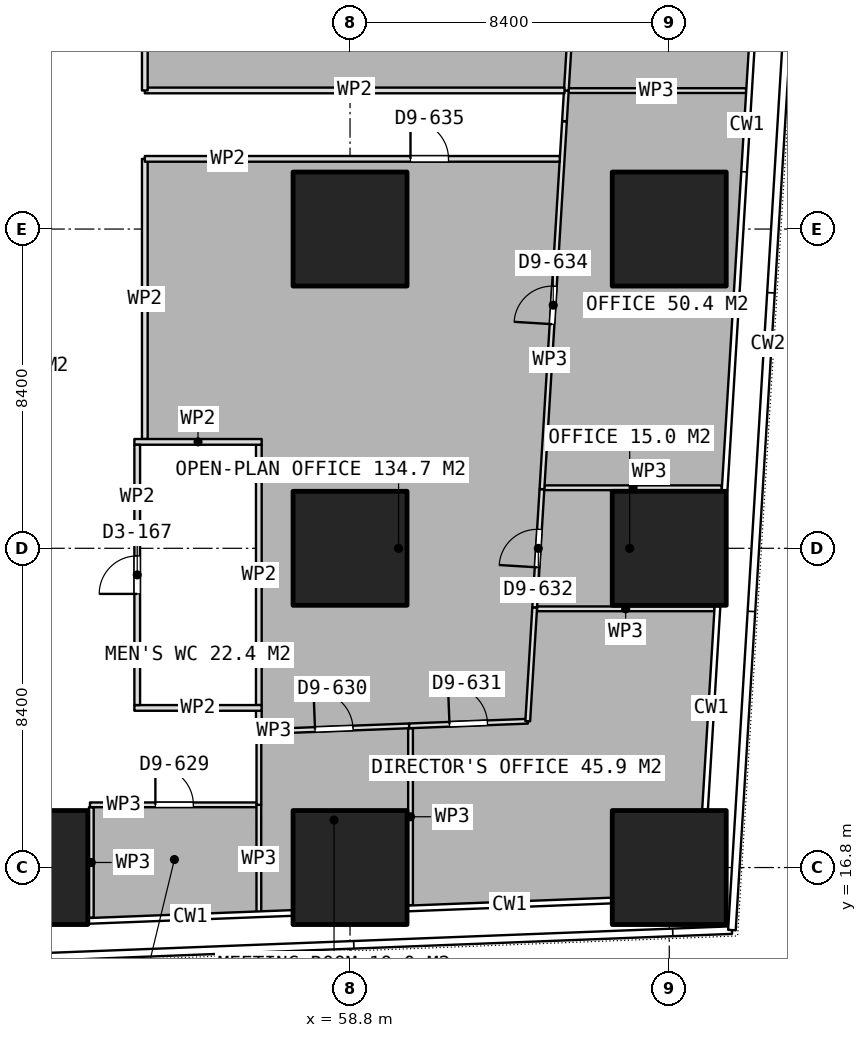
"""IFC4 building model, lengths in metres.
Left out: names, types, materials, properties, quantities, classifications, styles, units other than length and angle.
Written with IfcOpenShell. Run it as: python <this file> out.ifc"""

import sys

from ifc_helpers import new_model, si_unit, direction, frame, frame_2d, origin, origin_2d, place, context, subcontext, project, spatial, rectangle, extrude, element, fill, save


model = new_model("IFC4")
c1 = context("Model", 3, precision=1e-05, world=origin(), true_north=direction((0.0, 1.0)))
c2 = subcontext(c1, "Body", "Model", "MODEL_VIEW")
j1 = project(units=[si_unit("LENGTHUNIT", "METRE"), si_unit("PLANEANGLEUNIT", "RADIAN")], contexts=[c1])
p1 = place(None, origin())
s1 = spatial("IfcSite", under=j1, at=p1, CompositionType="ELEMENT")
p2 = place(p1, origin())
s2 = spatial("IfcBuilding", under=s1, at=p2, CompositionType="ELEMENT")
p3 = place(p2, frame((0.0, 0.0, 155.3)))
s3 = spatial("IfcBuildingStorey", under=s2, at=p3, CompositionType="ELEMENT", Elevation=155.3)
for number, where, z_axis, x_axis in (
    (1, (50.4, 16.8, 0.0), (0.0, 0.0, 1.0), (1.0, 0.0, 0.0)),
    (2, (58.8, 16.8, 0.0), (0.0, 0.0, 1.0), (1.0, 0.0, 0.0)),
    (3, (58.8, 25.2, 0.0), (0.0, 0.0, 1.0), (1.0, 0.0, 0.0)),
    (4, (58.8, 33.6, 0.0), (0.0, 0.0, 1.0), (1.0, 0.0, 0.0)),
    (5, (67.2, 16.8, 0.0), (0.0, 0.0, 1.0), (1.0, 0.0, 0.0)),
    (6, (67.2, 25.2, 0.0), (0.0, 0.0, 1.0), (1.0, 0.0, 0.0)),
    (7, (67.2, 33.6, 0.0), (0.0, 0.0, 1.0), (1.0, 0.0, 0.0)),
):
    element("IfcColumn", number, at=place(p3, frame(where, z_axis=z_axis, x_axis=x_axis)), inside=s3, PredefinedType="COLUMN", context=c2, shape_type="SweptSolid", body=[
        extrude(rectangle(XDim=3.0, YDim=3.0, at=origin_2d()), origin(), (0.0, 0.0, 1.0), 3.75),
    ])
for number, where, z_axis, x_axis in (
    (8, (53.125, 21.0, 0.0), (0.0, 0.0, 1.0), (1.0, 0.0, 0.0)),
    (9, (53.125, 28.0, 0.0), (0.0, 0.0, 1.0), (1.0, 0.0, 0.0)),
):
    element("IfcWall", number, at=place(p3, frame(where, z_axis=z_axis, x_axis=x_axis)), inside=s3, PredefinedType="PARTITIONING", context=c2, shape_type="SweptSolid", body=[
        extrude(rectangle(XDim=3.35, YDim=0.15, at=frame_2d((1.675, 0.0))), origin(), (0.0, 0.0, 1.0), 3.5),
    ])
p4 = place(p3, frame((53.2, 21.075, 0.0), z_axis=(0.0, 0.0, 1.0), x_axis=(0.0, 1.0, 0.0)))
e10 = element("IfcWall", 10, at=p4, inside=s3, PredefinedType="PARTITIONING", context=c2, shape_type="SweptSolid", body=[
    extrude(rectangle(XDim=6.85, YDim=0.15, at=frame_2d((3.425, 0.0))), origin(), (0.0, 0.0, 1.0), 3.5),
])
p5 = place(p4, frame((2.925, 0.0, 0.0)))
e11 = element("IfcOpeningElement", 11, at=p5, cuts=e10, PredefinedType="OPENING", context=c2, shape_type="SweptSolid", body=[
    extrude(rectangle(XDim=1.0, YDim=2.1, at=frame_2d((0.5, 1.05))), frame((0.0, 0.085, 0.0), z_axis=(0.0, -1.0, 0.0), x_axis=(1.0, 0.0, 0.0)), (0.0, 0.0, 1.0), 0.17),
])
p6 = place(p3, frame((56.4, 21.075, 0.0), z_axis=(0.0, 0.0, 1.0), x_axis=(0.0, 1.0, 0.0)))
e12 = element("IfcWall", 12, at=p6, inside=s3, PredefinedType="PARTITIONING", context=c2, shape_type="SweptSolid", body=[
    extrude(rectangle(XDim=6.85, YDim=0.15, at=frame_2d((3.425, 0.0))), origin(), (0.0, 0.0, 1.0), 3.5),
])
p7 = place(p3, frame((51.992, 15.479, 0.0), z_axis=(0.0, 0.0, 1.0), x_axis=(0.0, 1.0, 0.0)))
e13 = element("IfcWall", 13, at=p7, inside=s3, PredefinedType="PARTITIONING", context=c2, shape_type="SweptSolid", body=[
    extrude(rectangle(XDim=2.908, YDim=0.125, at=frame_2d((1.454, 0.0))), origin(), (0.0, 0.0, 1.0), 3.5),
])
p8 = place(p3, frame((51.957, 18.45, 0.0), z_axis=(0.0, 0.0, 1.0), x_axis=(1.0, 0.0, 0.0)))
e14 = element("IfcWall", 14, at=p8, inside=s3, PredefinedType="PARTITIONING", context=c2, shape_type="SweptSolid", body=[
    extrude(rectangle(XDim=4.443, YDim=0.125, at=frame_2d((2.221, 0.0))), origin(), (0.0, 0.0, 1.0), 3.5),
])
p9 = place(p8, frame((1.721, 0.0, 0.0)))
e15 = element("IfcOpeningElement", 15, at=p9, cuts=e14, PredefinedType="OPENING", context=c2, shape_type="SweptSolid", body=[
    extrude(rectangle(XDim=1.0, YDim=2.1, at=frame_2d((0.5, 1.05))), frame((0.0, 0.073, 0.0), z_axis=(0.0, -1.0, 0.0), x_axis=(1.0, 0.0, 0.0)), (0.0, 0.0, 1.0), 0.145),
])
p10 = place(p3, frame((56.4, 18.45, 0.0), z_axis=(0.0, 0.0, 1.0), x_axis=(0.000345095312, -0.999999940455, 0.0)))
e16 = element("IfcWall", 16, at=p10, inside=s3, PredefinedType="PARTITIONING", context=c2, shape_type="SweptSolid", body=[
    extrude(rectangle(XDim=2.83, YDim=0.125, at=frame_2d((1.415, 0.0))), origin(), (0.0, 0.0, 1.0), 3.5),
])
p11 = place(p3, frame((56.402, 18.45, 0.0), z_axis=(0.0, 0.0, 1.0), x_axis=(0.0, 1.0, 0.0)))
e17 = element("IfcWall", 17, at=p11, inside=s3, PredefinedType="PARTITIONING", context=c2, shape_type="SweptSolid", body=[
    extrude(rectangle(XDim=1.924, YDim=0.125, at=frame_2d((0.962, 0.0))), origin(), (0.0, 0.0, 1.0), 3.5),
])
p12 = place(p3, frame((56.402, 20.374, 0.0), z_axis=(0.0, 0.0, 1.0), x_axis=(0.999241819363, 0.03893310207, 0.0)))
e18 = element("IfcWall", 18, at=p12, inside=s3, PredefinedType="PARTITIONING", context=c2, shape_type="SweptSolid", body=[
    extrude(rectangle(XDim=3.957, YDim=0.125, at=frame_2d((1.979, 0.0))), origin(), (0.0, 0.0, 1.0), 3.5),
])
p13 = place(p12, frame((1.478, 0.0, 0.0)))
e19 = element("IfcOpeningElement", 19, at=p13, cuts=e18, PredefinedType="OPENING", context=c2, shape_type="SweptSolid", body=[
    extrude(rectangle(XDim=1.0, YDim=2.1, at=frame_2d((0.5, 1.05))), frame((0.0, 0.073, 0.0), z_axis=(0.0, -1.0, 0.0), x_axis=(1.0, 0.0, 0.0)), (0.0, 0.0, 1.0), 0.145),
])
p14 = place(p3, frame((60.392, 20.467, 0.0), z_axis=(0.0, 0.0, 1.0), x_axis=(0.0, -1.0, 0.0)))
e20 = element("IfcWall", 20, at=p14, inside=s3, PredefinedType="PARTITIONING", context=c2, shape_type="SweptSolid", body=[
    extrude(rectangle(XDim=4.661, YDim=0.125, at=frame_2d((2.331, 0.0))), origin(), (0.0, 0.0, 1.0), 3.5),
])
p15 = place(p3, frame((63.72, 23.607, 0.0), z_axis=(0.0, 0.0, 1.0), x_axis=(1.0, 0.0, 0.0)))
e21 = element("IfcWall", 21, at=p15, inside=s3, PredefinedType="PARTITIONING", context=c2, shape_type="SweptSolid", body=[
    extrude(rectangle(XDim=4.666, YDim=0.125, at=frame_2d((2.333, 0.0))), origin(), (0.0, 0.0, 1.0), 3.5),
])
p16 = place(p3, frame((60.357, 20.528, 0.0), z_axis=(0.0, 0.0, 1.0), x_axis=(0.999238123198, 0.03902785093, 0.0)))
e22 = element("IfcWall", 22, at=p16, inside=s3, PredefinedType="PARTITIONING", context=c2, shape_type="SweptSolid", body=[
    extrude(rectangle(XDim=3.122, YDim=0.125, at=frame_2d((1.561, 0.0))), origin(), (0.0, 0.0, 1.0), 3.5),
])
p17 = place(p16, frame((1.061, 0.0, 0.0)))
e23 = element("IfcOpeningElement", 23, at=p17, cuts=e22, PredefinedType="OPENING", context=c2, shape_type="SweptSolid", body=[
    extrude(rectangle(XDim=1.0, YDim=2.1, at=frame_2d((0.5, 1.05))), frame((0.0, 0.073, 0.0), z_axis=(0.0, -1.0, 0.0), x_axis=(1.0, 0.0, 0.0)), (0.0, 0.0, 1.0), 0.145),
])
p18 = place(p3, frame((63.476, 20.65, 0.0), z_axis=(0.0, 0.0, 1.0), x_axis=(0.061018961694, 0.99813660704, 0.0)))
e24 = element("IfcWall", 24, at=p18, inside=s3, PredefinedType="PARTITIONING", context=c2, shape_type="SweptSolid", body=[
    extrude(rectangle(XDim=2.997, YDim=0.125, at=frame_2d((1.499, 0.0))), origin(), (0.0, 0.0, 1.0), 3.5),
])
p19 = place(p3, frame((63.659, 23.642, 0.0), z_axis=(0.0, 0.0, 1.0), x_axis=(0.061296286925, 0.99811961468, 0.0)))
e25 = element("IfcWall", 25, at=p19, inside=s3, PredefinedType="PARTITIONING", context=c2, shape_type="SweptSolid", body=[
    extrude(rectangle(XDim=3.119, YDim=0.125, at=frame_2d((1.559, 0.0))), origin(), (0.0, 0.0, 1.0), 3.5),
])
p20 = place(p19, frame((1.059, 0.0, 0.0)))
e26 = element("IfcOpeningElement", 26, at=p20, cuts=e25, PredefinedType="OPENING", context=c2, shape_type="SweptSolid", body=[
    extrude(rectangle(XDim=1.0, YDim=2.1, at=frame_2d((0.5, 1.05))), frame((0.0, 0.073, 0.0), z_axis=(0.0, -1.0, 0.0), x_axis=(1.0, 0.0, 0.0)), (0.0, 0.0, 1.0), 0.145),
])
p21 = place(p3, frame((63.915, 26.793, 0.0), z_axis=(0.0, 0.0, 1.0), x_axis=(1.0, 0.0, 0.0)))
e27 = element("IfcWall", 27, at=p21, inside=s3, PredefinedType="PARTITIONING", context=c2, shape_type="SweptSolid", body=[
    extrude(rectangle(XDim=4.666, YDim=0.125, at=frame_2d((2.333, 0.0))), origin(), (0.0, 0.0, 1.0), 3.5),
])
p22 = place(p3, frame((64.492, 37.243, 0.0), z_axis=(0.0, 0.0, 1.0), x_axis=(1.0, 0.0, 0.0)))
e28 = element("IfcWall", 28, at=p22, inside=s3, PredefinedType="PARTITIONING", context=c2, shape_type="SweptSolid", body=[
    extrude(rectangle(XDim=4.729, YDim=0.125, at=frame_2d((2.365, 0.0))), origin(), (0.0, 0.0, 1.0), 3.5),
])
p23 = place(p3, frame((63.85, 26.756, 0.0), z_axis=(0.0, 0.0, 1.0), x_axis=(0.061135650065, 0.998129466698, 0.0)))
e29 = element("IfcWall", 29, at=p23, inside=s3, PredefinedType="PARTITIONING", context=c2, shape_type="SweptSolid", body=[
    extrude(rectangle(XDim=9.7, YDim=0.125, at=frame_2d((4.85, 0.0))), origin(), (0.0, 0.0, 1.0), 3.5),
])
p24 = place(p23, frame((4.35, 0.0, 0.0)))
e30 = element("IfcOpeningElement", 30, at=p24, cuts=e29, PredefinedType="OPENING", context=c2, shape_type="SweptSolid", body=[
    extrude(rectangle(XDim=1.0, YDim=2.1, at=frame_2d((0.5, 1.05))), frame((0.0, 0.073, 0.0), z_axis=(0.0, -1.0, 0.0), x_axis=(1.0, 0.0, 0.0)), (0.0, 0.0, 1.0), 0.145),
])
p25 = place(p3, frame((64.443, 36.438, 0.0), z_axis=(0.0, 0.0, 1.0), x_axis=(0.060549904231, 0.998165171251, 0.0)))
e31 = element("IfcWall", 31, at=p25, inside=s3, PredefinedType="PARTITIONING", context=c2, shape_type="SweptSolid", body=[
    extrude(rectangle(XDim=0.806, YDim=0.125, at=frame_2d((0.403, 0.0))), origin(), (0.0, 0.0, 1.0), 3.5),
])
p26 = place(p3, frame((64.492, 37.244, 0.0), z_axis=(0.0, 0.0, 1.0), x_axis=(0.061157948018, 0.998128100694, 0.0)))
e32 = element("IfcWall", 32, at=p26, inside=s3, PredefinedType="PARTITIONING", context=c2, shape_type="SweptSolid", body=[
    extrude(rectangle(XDim=6.427, YDim=0.125, at=frame_2d((3.213, 0.0))), origin(), (0.0, 0.0, 1.0), 3.5),
])
p27 = place(p3, frame((64.443, 37.247, 0.0), z_axis=(0.0, 0.0, 1.0), x_axis=(-1.0, 0.0, 0.0)))
e33 = element("IfcWall", 33, at=p27, inside=s3, PredefinedType="PARTITIONING", context=c2, shape_type="SweptSolid", body=[
    extrude(rectangle(XDim=11.043, YDim=0.15, at=frame_2d((5.521, 0.0))), origin(), (0.0, 0.0, 1.0), 3.5),
])
p28 = place(p3, frame((53.4, 37.247, 0.0), z_axis=(0.0, 0.0, 1.0), x_axis=(0.0, 1.0, 0.0)))
e34 = element("IfcWall", 34, at=p28, inside=s3, PredefinedType="PARTITIONING", context=c2, shape_type="SweptSolid", body=[
    extrude(rectangle(XDim=16.153, YDim=0.15, at=frame_2d((8.076, 0.0))), origin(), (0.0, 0.0, 1.0), 3.5),
])
p29 = place(p28, frame((7.576, 0.0, 0.0)))
e35 = element("IfcOpeningElement", 35, at=p29, cuts=e34, PredefinedType="OPENING", context=c2, shape_type="SweptSolid", body=[
    extrude(rectangle(XDim=1.0, YDim=2.1, at=frame_2d((0.5, 1.05))), frame((0.0, 0.085, 0.0), z_axis=(0.0, -1.0, 0.0), x_axis=(1.0, 0.0, 0.0)), (0.0, 0.0, 1.0), 0.17),
])
p30 = place(p3, frame((56.4, 20.374, 0.0), z_axis=(0.0, 0.0, 1.0), x_axis=(0.0, 1.0, 0.0)))
e36 = element("IfcWall", 36, at=p30, inside=s3, PredefinedType="PARTITIONING", context=c2, shape_type="SweptSolid", body=[
    extrude(rectangle(XDim=0.551, YDim=0.15, at=frame_2d((0.275, 0.0))), origin(), (0.0, 0.0, 1.0), 3.5),
])
p31 = place(p3, frame((53.4, 28.075, 0.0), z_axis=(0.0, 0.0, 1.0), x_axis=(0.0, 1.0, 0.0)))
e37 = element("IfcWall", 37, at=p31, inside=s3, PredefinedType="PARTITIONING", context=c2, shape_type="SweptSolid", body=[
    extrude(rectangle(XDim=7.372, YDim=0.15, at=frame_2d((3.686, 0.0))), origin(), (0.0, 0.0, 1.0), 3.5),
])
p32 = place(p3, frame((53.4, 35.447, 0.0), z_axis=(0.0, 0.0, 1.0), x_axis=(1.0, 0.0, 0.0)))
e38 = element("IfcWall", 38, at=p32, inside=s3, PredefinedType="PARTITIONING", context=c2, shape_type="SweptSolid", body=[
    extrude(rectangle(XDim=10.92, YDim=0.15, at=frame_2d((5.46, 0.0))), origin(), (0.0, 0.0, 1.0), 3.5),
])
p33 = place(p32, frame((6.991, 0.0, 0.0)))
e39 = element("IfcOpeningElement", 39, at=p33, cuts=e38, PredefinedType="OPENING", context=c2, shape_type="SweptSolid", body=[
    extrude(rectangle(XDim=1.0, YDim=2.1, at=frame_2d((0.5, 1.05))), frame((0.0, 0.085, 0.0), z_axis=(0.0, -1.0, 0.0), x_axis=(1.0, 0.0, 0.0)), (0.0, 0.0, 1.0), 0.17),
])
p34 = place(p5, origin())
e40 = element("IfcDoor", 40, at=p34, inside=s3, OperationType="SINGLE_SWING_LEFT", PredefinedType="DOOR", context=c2, shape_type="SweptSolid", body=[
    extrude(rectangle(XDim=1.0, YDim=2.1, at=frame_2d((0.5, 1.05))), frame((0.0, 0.025, 0.0), z_axis=(0.0, -1.0, 0.0), x_axis=(1.0, 0.0, 0.0)), (0.0, 0.0, 1.0), 0.05),
])
fill(e11, e40)
p35 = place(p9, origin())
e41 = element("IfcDoor", 41, at=p35, inside=s3, OperationType="SINGLE_SWING_LEFT", PredefinedType="DOOR", context=c2, shape_type="SweptSolid", body=[
    extrude(rectangle(XDim=1.0, YDim=2.1, at=frame_2d((0.5, 1.05))), frame((0.0, 0.025, 0.0), z_axis=(0.0, -1.0, 0.0), x_axis=(1.0, 0.0, 0.0)), (0.0, 0.0, 1.0), 0.05),
])
fill(e15, e41)
p36 = place(p13, origin())
e42 = element("IfcDoor", 42, at=p36, inside=s3, OperationType="SINGLE_SWING_LEFT", PredefinedType="DOOR", context=c2, shape_type="SweptSolid", body=[
    extrude(rectangle(XDim=1.0, YDim=2.1, at=frame_2d((0.5, 1.05))), frame((0.0, 0.025, 0.0), z_axis=(0.0, -1.0, 0.0), x_axis=(1.0, 0.0, 0.0)), (0.0, 0.0, 1.0), 0.05),
])
fill(e19, e42)
p37 = place(p17, origin())
e43 = element("IfcDoor", 43, at=p37, inside=s3, OperationType="SINGLE_SWING_LEFT", PredefinedType="DOOR", context=c2, shape_type="SweptSolid", body=[
    extrude(rectangle(XDim=1.0, YDim=2.1, at=frame_2d((0.5, 1.05))), frame((0.0, 0.025, 0.0), z_axis=(0.0, -1.0, 0.0), x_axis=(1.0, 0.0, 0.0)), (0.0, 0.0, 1.0), 0.05),
])
fill(e23, e43)
p38 = place(p20, origin())
e44 = element("IfcDoor", 44, at=p38, inside=s3, OperationType="SINGLE_SWING_LEFT", PredefinedType="DOOR", context=c2, shape_type="SweptSolid", body=[
    extrude(rectangle(XDim=1.0, YDim=2.1, at=frame_2d((0.5, 1.05))), frame((0.0, 0.025, 0.0), z_axis=(0.0, -1.0, 0.0), x_axis=(1.0, 0.0, 0.0)), (0.0, 0.0, 1.0), 0.05),
])
fill(e26, e44)
p39 = place(p24, origin())
e45 = element("IfcDoor", 45, at=p39, inside=s3, OperationType="SINGLE_SWING_LEFT", PredefinedType="DOOR", context=c2, shape_type="SweptSolid", body=[
    extrude(rectangle(XDim=1.0, YDim=2.1, at=frame_2d((0.5, 1.05))), frame((0.0, 0.025, 0.0), z_axis=(0.0, -1.0, 0.0), x_axis=(1.0, 0.0, 0.0)), (0.0, 0.0, 1.0), 0.05),
])
fill(e30, e45)
p40 = place(p33, origin())
e46 = element("IfcDoor", 46, at=p40, inside=s3, OperationType="SINGLE_SWING_LEFT", PredefinedType="DOOR", context=c2, shape_type="SweptSolid", body=[
    extrude(rectangle(XDim=1.0, YDim=2.1, at=frame_2d((0.5, 1.05))), frame((0.0, 0.025, 0.0), z_axis=(0.0, -1.0, 0.0), x_axis=(1.0, 0.0, 0.0)), (0.0, 0.0, 1.0), 0.05),
])
fill(e39, e46)
save(model, sys.argv[1])
